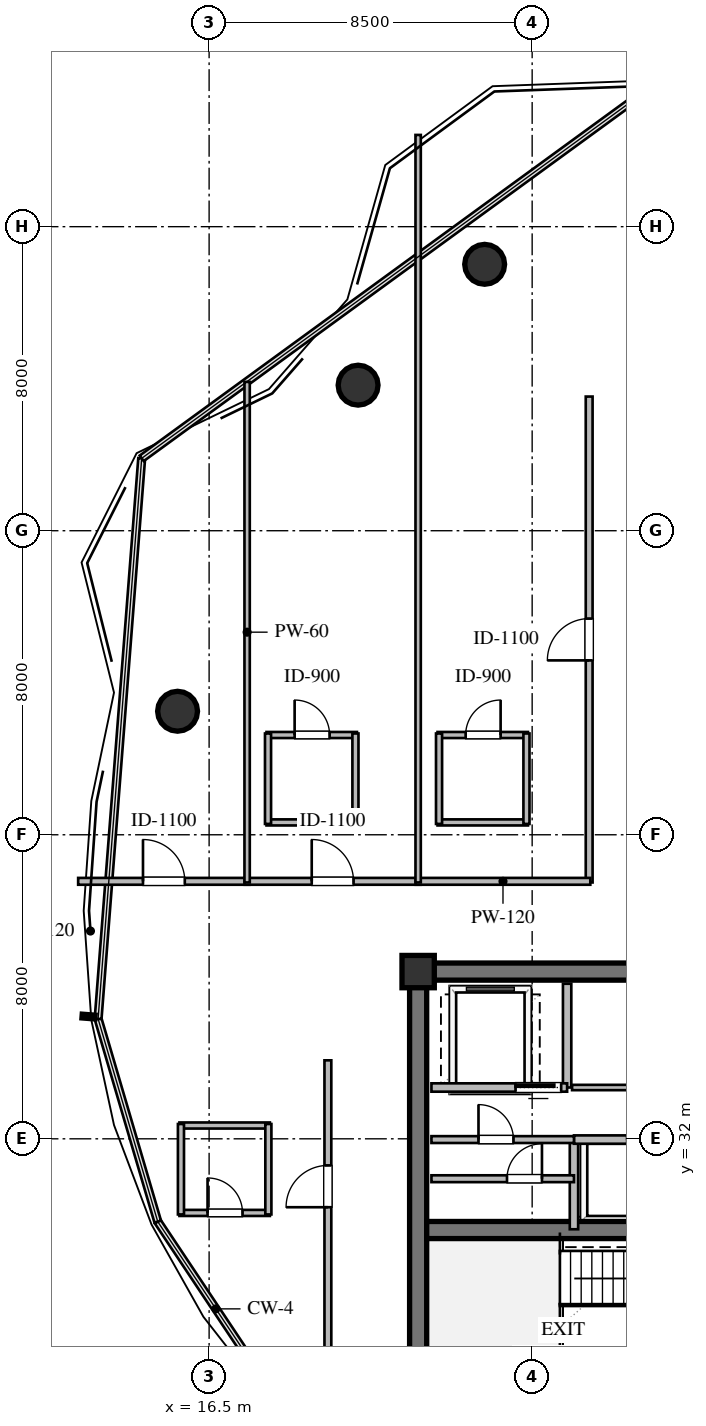
"""IFC4 building model, lengths in metres.
Left out: names, types, materials, properties, quantities, classifications, styles, units other than length and angle.
Written with IfcOpenShell. Run it as: python <this file> out.ifc"""

import sys

from ifc_helpers import new_model, si_unit, direction, frame, frame_2d, origin, origin_2d, place, context, subcontext, project, spatial, rectangle, circle, extrude, element, fill, save


model = new_model("IFC4")
c1 = context("Model", 3, precision=1e-05, world=origin(), true_north=direction((0.0, 1.0)))
c2 = subcontext(c1, "Body", "Model", "MODEL_VIEW")
j1 = project(units=[si_unit("LENGTHUNIT", "METRE"), si_unit("PLANEANGLEUNIT", "RADIAN")], contexts=[c1])
p1 = place(None, origin())
s1 = spatial("IfcSite", under=j1, at=p1, CompositionType="ELEMENT")
p2 = place(p1, origin())
s2 = spatial("IfcBuilding", under=s1, at=p2, CompositionType="ELEMENT")
p3 = place(p2, frame((0.0, 0.0, 220.8)))
s3 = spatial("IfcBuildingStorey", under=s2, at=p3, CompositionType="ELEMENT", Elevation=220.8)
p4 = place(p3, frame((21.775, 36.4, 0.0), z_axis=(0.0, 0.0, 1.0), x_axis=(1.0, 0.0, 0.0)))
e1 = element("IfcWall", 1, at=p4, inside=s3, PredefinedType="SHEAR", context=c2, shape_type="SweptSolid", body=[
    extrude(rectangle(XDim=22.45, YDim=0.45, at=frame_2d((11.225, 0.0))), origin(), (0.0, 0.0, 1.0), 3.36),
])
p5 = place(p3, frame((22.0, 23.825, 0.0), z_axis=(0.0, 0.0, 1.0), x_axis=(0.0, 1.0, 0.0)))
e2 = element("IfcWall", 2, at=p5, inside=s3, PredefinedType="SHEAR", context=c2, shape_type="SweptSolid", body=[
    extrude(rectangle(XDim=12.35, YDim=0.45, at=frame_2d((6.175, 0.0))), origin(), (0.0, 0.0, 1.0), 3.36),
])
p6 = place(p3, frame((22.225, 29.6, 0.0), z_axis=(0.0, 0.0, 1.0), x_axis=(1.0, 0.0, 0.0)))
e3 = element("IfcWall", 3, at=p6, inside=s3, PredefinedType="SHEAR", context=c2, shape_type="SweptSolid", body=[
    extrude(rectangle(XDim=21.55, YDim=0.45, at=frame_2d((10.775, 0.0))), origin(), (0.0, 0.0, 1.0), 3.36),
])
p7 = place(p6, frame((12.225, 0.0, 0.0)))
e4 = element("IfcOpeningElement", 4, at=p7, cuts=e3, PredefinedType="OPENING", context=c2, shape_type="SweptSolid", body=[
    extrude(rectangle(XDim=1.15, YDim=2.1, at=frame_2d((0.575, 1.05))), frame((0.0, 0.235, 0.0), z_axis=(0.0, -1.0, 0.0), x_axis=(1.0, 0.0, 0.0)), (0.0, 0.0, 1.0), 0.47),
])
p8 = place(p3, frame((22.0, 36.4, 0.0), z_axis=(0.0, 0.0, 1.0), x_axis=(1.0, 0.0, 0.0)))
e5 = element("IfcColumn", 5, at=p8, inside=s3, PredefinedType="COLUMN", context=c2, shape_type="SweptSolid", body=[
    extrude(rectangle(XDim=0.85, YDim=0.85, at=origin_2d()), origin(), (0.0, 0.0, 1.0), 3.6),
])
for number, where, z_axis, x_axis in (
    (6, (23.75, 55.01, 0.0), (0.0, 0.0, 1.0), (1.0, 0.0, 0.0)),
    (7, (20.42, 51.83, 0.0), (0.0, 0.0, 1.0), (1.0, 0.0, 0.0)),
    (8, (15.67, 43.25, 0.0), (0.0, 0.0, 1.0), (1.0, 0.0, 0.0)),
):
    element("IfcColumn", number, at=place(p3, frame(where, z_axis=z_axis, x_axis=x_axis)), inside=s3, PredefinedType="COLUMN", context=c2, shape_type="SweptSolid", body=[
        extrude(circle(Radius=0.525, at=origin_2d()), origin(), (0.0, 0.0, 1.0), 3.6),
    ])
p9 = place(p3, frame((25.92, 33.35, 0.0), z_axis=(0.0, 0.0, 1.0), x_axis=(0.0, 1.0, 0.0)))
e9 = element("IfcWall", 9, at=p9, inside=s3, PredefinedType="SOLIDWALL", context=c2, shape_type="SweptSolid", body=[
    extrude(rectangle(XDim=2.73, YDim=0.22, at=frame_2d((1.365, 0.0))), origin(), (0.0, 0.0, 1.0), 3.36),
])
p10 = place(p3, frame((22.35, 33.35, 0.0), z_axis=(0.0, 0.0, 1.0), x_axis=(1.0, 0.0, 0.0)))
e10 = element("IfcWall", 10, at=p10, inside=s3, PredefinedType="SOLIDWALL", context=c2, shape_type="SweptSolid", body=[
    extrude(rectangle(XDim=3.57, YDim=0.22, at=frame_2d((1.785, 0.0))), origin(), (0.0, 0.0, 1.0), 3.36),
])
p11 = place(p10, frame((2.213, 0.0, 0.0)))
e11 = element("IfcOpeningElement", 11, at=p11, cuts=e10, PredefinedType="OPENING", context=c2, shape_type="SweptSolid", body=[
    extrude(rectangle(XDim=1.2, YDim=2.1, at=frame_2d((0.6, 1.05))), frame((0.0, 0.12, 0.0), z_axis=(0.0, -1.0, 0.0), x_axis=(1.0, 0.0, 0.0)), (0.0, 0.0, 1.0), 0.24),
])
p12 = place(p3, frame((26.1, 29.62, 0.0), z_axis=(0.0, 0.0, 1.0), x_axis=(0.0, 1.0, 0.0)))
e12 = element("IfcWall", 12, at=p12, inside=s3, PredefinedType="SOLIDWALL", context=c2, shape_type="SweptSolid", body=[
    extrude(rectangle(XDim=2.36, YDim=0.22, at=frame_2d((1.18, 0.0))), origin(), (0.0, 0.0, 1.0), 3.36),
])
p13 = place(p3, frame((26.1, 31.98, 0.0), z_axis=(0.0, 0.0, 1.0), x_axis=(1.0, 0.0, 0.0)))
e13 = element("IfcWall", 13, at=p13, inside=s3, PredefinedType="SOLIDWALL", context=c2, shape_type="SweptSolid", body=[
    extrude(rectangle(XDim=7.8, YDim=0.22, at=frame_2d((3.9, 0.0))), origin(), (0.0, 0.0, 1.0), 3.36),
])
p14 = place(p13, frame((1.4, 0.0, 0.0)))
e14 = element("IfcOpeningElement", 14, at=p14, cuts=e13, PredefinedType="OPENING", context=c2, shape_type="SweptSolid", body=[
    extrude(rectangle(XDim=1.1, YDim=2.1, at=frame_2d((0.55, 1.05))), frame((0.0, 0.12, 0.0), z_axis=(0.0, -1.0, 0.0), x_axis=(1.0, 0.0, 0.0)), (0.0, 0.0, 1.0), 0.24),
])
p15 = place(p13, frame((5.066, 0.0, 0.0)))
e15 = element("IfcOpeningElement", 15, at=p15, cuts=e13, PredefinedType="OPENING", context=c2, shape_type="SweptSolid", body=[
    extrude(rectangle(XDim=1.1, YDim=2.1, at=frame_2d((0.55, 1.05))), frame((0.0, 0.12, 0.0), z_axis=(0.0, -1.0, 0.0), x_axis=(1.0, 0.0, 0.0)), (0.0, 0.0, 1.0), 0.24),
])
p16 = place(p3, frame((26.05, 33.35, 0.0), z_axis=(0.0, 0.0, 1.0), x_axis=(1.0, 0.0, 0.0)))
e16 = element("IfcWall", 16, at=p16, inside=s3, PredefinedType="PARTITIONING", context=c2, shape_type="SweptSolid", body=[
    extrude(rectangle(XDim=3.95, YDim=0.14, at=frame_2d((1.975, 0.0))), origin(), (0.0, 0.0, 1.0), 3.36),
])
p17 = place(p16, frame((1.515, 0.0, 0.0)))
e17 = element("IfcOpeningElement", 17, at=p17, cuts=e16, PredefinedType="OPENING", context=c2, shape_type="SweptSolid", body=[
    extrude(rectangle(XDim=0.92, YDim=2.1, at=frame_2d((0.46, 1.05))), frame((0.0, 0.08, 0.0), z_axis=(0.0, -1.0, 0.0), x_axis=(1.0, 0.0, 0.0)), (0.0, 0.0, 1.0), 0.16),
])
p18 = place(p3, frame((22.35, 30.95, 0.0), z_axis=(0.0, 0.0, 1.0), x_axis=(1.0, 0.0, 0.0)))
e18 = element("IfcWall", 18, at=p18, inside=s3, PredefinedType="PARTITIONING", context=c2, shape_type="SweptSolid", body=[
    extrude(rectangle(XDim=3.75, YDim=0.18, at=frame_2d((1.875, 0.0))), origin(), (0.0, 0.0, 1.0), 3.36),
])
p19 = place(p18, frame((1.988, 0.0, 0.0)))
e19 = element("IfcOpeningElement", 19, at=p19, cuts=e18, PredefinedType="OPENING", context=c2, shape_type="SweptSolid", body=[
    extrude(rectangle(XDim=0.92, YDim=2.1, at=frame_2d((0.46, 1.05))), frame((0.0, 0.1, 0.0), z_axis=(0.0, -1.0, 0.0), x_axis=(1.0, 0.0, 0.0)), (0.0, 0.0, 1.0), 0.2),
])
p20 = place(p3, frame((22.35, 31.98, 0.0), z_axis=(0.0, 0.0, 1.0), x_axis=(1.0, 0.0, 0.0)))
e20 = element("IfcWall", 20, at=p20, inside=s3, PredefinedType="PARTITIONING", context=c2, shape_type="SweptSolid", body=[
    extrude(rectangle(XDim=3.75, YDim=0.18, at=frame_2d((1.875, 0.0))), origin(), (0.0, 0.0, 1.0), 3.36),
])
p21 = place(p20, frame((1.238, 0.0, 0.0)))
e21 = element("IfcOpeningElement", 21, at=p21, cuts=e20, PredefinedType="OPENING", context=c2, shape_type="SweptSolid", body=[
    extrude(rectangle(XDim=0.92, YDim=2.1, at=frame_2d((0.46, 1.05))), frame((0.0, 0.1, 0.0), z_axis=(0.0, -1.0, 0.0), x_axis=(1.0, 0.0, 0.0)), (0.0, 0.0, 1.0), 0.2),
])
p22 = place(p3, frame((18.01, 40.325, 0.0), z_axis=(0.0, 0.0, 1.0), x_axis=(1.0, 0.0, 0.0)))
e22 = element("IfcWall", 22, at=p22, inside=s3, PredefinedType="PLUMBINGWALL", context=c2, shape_type="SweptSolid", body=[
    extrude(rectangle(XDim=2.38, YDim=0.16, at=frame_2d((1.19, 0.0))), origin(), (0.0, 0.0, 1.0), 3.36),
])
p23 = place(p3, frame((18.01, 42.625, 0.0), z_axis=(0.0, 0.0, 1.0), x_axis=(1.0, 0.0, 0.0)))
e23 = element("IfcWall", 23, at=p23, inside=s3, PredefinedType="PLUMBINGWALL", context=c2, shape_type="SweptSolid", body=[
    extrude(rectangle(XDim=2.38, YDim=0.16, at=frame_2d((1.19, 0.0))), origin(), (0.0, 0.0, 1.0), 3.36),
])
p24 = place(p23, frame((0.74, 0.0, 0.0)))
e24 = element("IfcOpeningElement", 24, at=p24, cuts=e23, PredefinedType="OPENING", context=c2, shape_type="SweptSolid", body=[
    extrude(rectangle(XDim=0.92, YDim=2.1, at=frame_2d((0.46, 1.05))), frame((0.0, 0.09, 0.0), z_axis=(0.0, -1.0, 0.0), x_axis=(1.0, 0.0, 0.0)), (0.0, 0.0, 1.0), 0.18),
])
for number, where, z_axis, x_axis in (
    (25, (18.05, 40.285, 0.0), (0.0, 0.0, 1.0), (0.0, 1.0, 0.0)),
    (26, (20.35, 40.285, 0.0), (0.0, 0.0, 1.0), (0.0, 1.0, 0.0)),
):
    element("IfcWall", number, at=place(p3, frame(where, z_axis=z_axis, x_axis=x_axis)), inside=s3, PredefinedType="PLUMBINGWALL", context=c2, shape_type="SweptSolid", body=[
        extrude(rectangle(XDim=2.38, YDim=0.16, at=frame_2d((1.19, 0.0))), origin(), (0.0, 0.0, 1.0), 3.36),
    ])
p25 = place(p3, frame((22.51, 40.325, 0.0), z_axis=(0.0, 0.0, 1.0), x_axis=(1.0, 0.0, 0.0)))
e27 = element("IfcWall", 27, at=p25, inside=s3, PredefinedType="PLUMBINGWALL", context=c2, shape_type="SweptSolid", body=[
    extrude(rectangle(XDim=2.38, YDim=0.16, at=frame_2d((1.19, 0.0))), origin(), (0.0, 0.0, 1.0), 3.36),
])
p26 = place(p3, frame((22.51, 42.625, 0.0), z_axis=(0.0, 0.0, 1.0), x_axis=(1.0, 0.0, 0.0)))
e28 = element("IfcWall", 28, at=p26, inside=s3, PredefinedType="PLUMBINGWALL", context=c2, shape_type="SweptSolid", body=[
    extrude(rectangle(XDim=2.38, YDim=0.16, at=frame_2d((1.19, 0.0))), origin(), (0.0, 0.0, 1.0), 3.36),
])
p27 = place(p26, frame((0.74, 0.0, 0.0)))
e29 = element("IfcOpeningElement", 29, at=p27, cuts=e28, PredefinedType="OPENING", context=c2, shape_type="SweptSolid", body=[
    extrude(rectangle(XDim=0.92, YDim=2.1, at=frame_2d((0.46, 1.05))), frame((0.0, 0.09, 0.0), z_axis=(0.0, -1.0, 0.0), x_axis=(1.0, 0.0, 0.0)), (0.0, 0.0, 1.0), 0.18),
])
p28 = place(p3, frame((22.55, 40.285, 0.0), z_axis=(0.0, 0.0, 1.0), x_axis=(0.0, 1.0, 0.0)))
e30 = element("IfcWall", 30, at=p28, inside=s3, PredefinedType="PLUMBINGWALL", context=c2, shape_type="SweptSolid", body=[
    extrude(rectangle(XDim=2.38, YDim=0.16, at=frame_2d((1.19, 0.0))), origin(), (0.0, 0.0, 1.0), 2.806),
])
p29 = place(p3, frame((24.85, 40.285, 0.0), z_axis=(0.0, 0.0, 1.0), x_axis=(0.0, 1.0, 0.0)))
e31 = element("IfcWall", 31, at=p29, inside=s3, PredefinedType="PLUMBINGWALL", context=c2, shape_type="SweptSolid", body=[
    extrude(rectangle(XDim=2.38, YDim=0.16, at=frame_2d((1.19, 0.0))), origin(), (0.0, 0.0, 1.0), 3.36),
])
p30 = place(p3, frame((15.719, 30.05, 0.0), z_axis=(0.0, 0.0, 1.0), x_axis=(1.0, 0.0, 0.0)))
e32 = element("IfcWall", 32, at=p30, inside=s3, PredefinedType="PLUMBINGWALL", context=c2, shape_type="SweptSolid", body=[
    extrude(rectangle(XDim=2.38, YDim=0.16, at=frame_2d((1.19, 0.0))), origin(), (0.0, 0.0, 1.0), 3.36),
])
p31 = place(p30, frame((0.74, 0.0, 0.0)))
e33 = element("IfcOpeningElement", 33, at=p31, cuts=e32, PredefinedType="OPENING", context=c2, shape_type="SweptSolid", body=[
    extrude(rectangle(XDim=0.92, YDim=2.1, at=frame_2d((0.46, 1.05))), frame((0.0, 0.09, 0.0), z_axis=(0.0, -1.0, 0.0), x_axis=(1.0, 0.0, 0.0)), (0.0, 0.0, 1.0), 0.18),
])
p32 = place(p3, frame((15.719, 32.35, 0.0), z_axis=(0.0, 0.0, 1.0), x_axis=(1.0, 0.0, 0.0)))
e34 = element("IfcWall", 34, at=p32, inside=s3, PredefinedType="PLUMBINGWALL", context=c2, shape_type="SweptSolid", body=[
    extrude(rectangle(XDim=2.38, YDim=0.16, at=frame_2d((1.19, 0.0))), origin(), (0.0, 0.0, 1.0), 3.36),
])
p33 = place(p3, frame((15.759, 30.01, 0.0), z_axis=(0.0, 0.0, 1.0), x_axis=(0.0, 1.0, 0.0)))
e35 = element("IfcWall", 35, at=p33, inside=s3, PredefinedType="PLUMBINGWALL", context=c2, shape_type="SweptSolid", body=[
    extrude(rectangle(XDim=2.38, YDim=0.16, at=frame_2d((1.19, 0.0))), origin(), (0.0, 0.0, 1.0), 3.36),
])
p34 = place(p3, frame((18.059, 30.01, 0.0), z_axis=(0.0, 0.0, 1.0), x_axis=(0.0, 1.0, 0.0)))
e36 = element("IfcWall", 36, at=p34, inside=s3, PredefinedType="PLUMBINGWALL", context=c2, shape_type="SweptSolid", body=[
    extrude(rectangle(XDim=2.38, YDim=0.16, at=frame_2d((1.19, 0.0))), origin(), (0.0, 0.0, 1.0), 2.817),
])
p35 = place(p3, frame((13.054, 38.775, 0.0), z_axis=(0.0, 0.0, 1.0), x_axis=(1.0, 0.0, 0.0)))
e37 = element("IfcWall", 37, at=p35, inside=s3, PredefinedType="PARTITIONING", context=c2, shape_type="SweptSolid", body=[
    extrude(rectangle(XDim=4.511, YDim=0.18, at=frame_2d((2.255, 0.0))), origin(), (0.0, 0.0, 1.0), 3.36),
])
p36 = place(p35, frame((1.706, 0.0, 0.0)))
e38 = element("IfcOpeningElement", 38, at=p36, cuts=e37, PredefinedType="OPENING", context=c2, shape_type="SweptSolid", body=[
    extrude(rectangle(XDim=1.1, YDim=2.1, at=frame_2d((0.55, 1.05))), frame((0.0, 0.1, 0.0), z_axis=(0.0, -1.0, 0.0), x_axis=(1.0, 0.0, 0.0)), (0.0, 0.0, 1.0), 0.2),
])
p37 = place(p3, frame((17.435, 38.775, 0.0), z_axis=(0.0, 0.0, 1.0), x_axis=(1.0, 0.0, 0.0)))
e39 = element("IfcWall", 39, at=p37, inside=s3, PredefinedType="PARTITIONING", context=c2, shape_type="SweptSolid", body=[
    extrude(rectangle(XDim=4.63, YDim=0.18, at=frame_2d((2.315, 0.0))), origin(), (0.0, 0.0, 1.0), 3.36),
])
p38 = place(p37, frame((1.765, 0.0, 0.0)))
e40 = element("IfcOpeningElement", 40, at=p38, cuts=e39, PredefinedType="OPENING", context=c2, shape_type="SweptSolid", body=[
    extrude(rectangle(XDim=1.1, YDim=2.1, at=frame_2d((0.55, 1.05))), frame((0.0, 0.1, 0.0), z_axis=(0.0, -1.0, 0.0), x_axis=(1.0, 0.0, 0.0)), (0.0, 0.0, 1.0), 0.2),
])
p39 = place(p3, frame((26.5, 38.745, 0.0), z_axis=(0.0, 0.0, 1.0), x_axis=(0.0, 1.0, 0.0)))
e41 = element("IfcWall", 41, at=p39, inside=s3, PredefinedType="PARTITIONING", context=c2, shape_type="SweptSolid", body=[
    extrude(rectangle(XDim=12.785, YDim=0.18, at=frame_2d((6.393, 0.0))), origin(), (0.0, 0.0, 1.0), 3.36),
])
p40 = place(p39, frame((5.843, 0.0, 0.0)))
e42 = element("IfcOpeningElement", 42, at=p40, cuts=e41, PredefinedType="OPENING", context=c2, shape_type="SweptSolid", body=[
    extrude(rectangle(XDim=1.1, YDim=2.1, at=frame_2d((0.55, 1.05))), frame((0.0, 0.1, 0.0), z_axis=(0.0, -1.0, 0.0), x_axis=(1.0, 0.0, 0.0)), (0.0, 0.0, 1.0), 0.2),
])
p41 = place(p3, frame((21.935, 38.775, 0.0), z_axis=(0.0, 0.0, 1.0), x_axis=(1.0, 0.0, 0.0)))
e43 = element("IfcWall", 43, at=p41, inside=s3, PredefinedType="PARTITIONING", context=c2, shape_type="SweptSolid", body=[
    extrude(rectangle(XDim=4.595, YDim=0.18, at=frame_2d((2.297, 0.0))), origin(), (0.0, 0.0, 1.0), 3.36),
])
p42 = place(p3, frame((19.625, 24.06, 0.0), z_axis=(0.0, 0.0, 1.0), x_axis=(0.0, 1.0, 0.0)))
e44 = element("IfcWall", 44, at=p42, inside=s3, PredefinedType="PARTITIONING", context=c2, shape_type="SweptSolid", body=[
    extrude(rectangle(XDim=10.005, YDim=0.18, at=frame_2d((5.002, 0.0))), origin(), (0.0, 0.0, 1.0), 2.817),
])
p43 = place(p42, frame((6.14, 0.0, 0.0)))
e45 = element("IfcOpeningElement", 45, at=p43, cuts=e44, PredefinedType="OPENING", context=c2, shape_type="SweptSolid", body=[
    extrude(rectangle(XDim=1.1, YDim=2.1, at=frame_2d((0.55, 1.05))), frame((0.0, 0.1, 0.0), z_axis=(0.0, -1.0, 0.0), x_axis=(1.0, 0.0, 0.0)), (0.0, 0.0, 1.0), 0.2),
])
p44 = place(p3, frame((17.5, 51.916, 0.0), z_axis=(0.0, 0.0, 1.0), x_axis=(0.0, -1.0, 0.0)))
e46 = element("IfcWall", 46, at=p44, inside=s3, PredefinedType="PARTITIONING", context=c2, shape_type="SweptSolid", body=[
    extrude(rectangle(XDim=13.171, YDim=0.14, at=frame_2d((6.585, 0.0))), origin(), (0.0, 0.0, 1.0), 3.36),
])
p45 = place(p3, frame((22.0, 58.414, 0.0), z_axis=(0.0, 0.0, 1.0), x_axis=(0.0, -1.0, 0.0)))
e47 = element("IfcWall", 47, at=p45, inside=s3, PredefinedType="PARTITIONING", context=c2, shape_type="SweptSolid", body=[
    extrude(rectangle(XDim=19.669, YDim=0.14, at=frame_2d((9.834, 0.0))), origin(), (0.0, 0.0, 1.0), 2.806),
])
p46 = place(p11, origin())
e48 = element("IfcDoor", 48, at=p46, inside=s3, OperationType="SLIDING_TO_LEFT", PredefinedType="DOOR", context=c2, shape_type="SweptSolid", body=[
    extrude(rectangle(XDim=1.2, YDim=2.1, at=frame_2d((0.6, 1.05))), frame((0.0, 0.025, 0.0), z_axis=(0.0, -1.0, 0.0), x_axis=(1.0, 0.0, 0.0)), (0.0, 0.0, 1.0), 0.05),
])
fill(e11, e48)
p47 = place(p21, origin())
e49 = element("IfcDoor", 49, at=p47, inside=s3, OperationType="SINGLE_SWING_LEFT", PredefinedType="DOOR", context=c2, shape_type="SweptSolid", body=[
    extrude(rectangle(XDim=0.92, YDim=2.1, at=frame_2d((0.46, 1.05))), frame((0.0, 0.025, 0.0), z_axis=(0.0, -1.0, 0.0), x_axis=(1.0, 0.0, 0.0)), (0.0, 0.0, 1.0), 0.05),
])
fill(e21, e49)
p48 = place(p19, origin())
e50 = element("IfcDoor", 50, at=p48, inside=s3, OperationType="SINGLE_SWING_RIGHT", PredefinedType="DOOR", context=c2, shape_type="SweptSolid", body=[
    extrude(rectangle(XDim=0.92, YDim=2.1, at=frame_2d((0.46, 1.05))), frame((0.0, 0.025, 0.0), z_axis=(0.0, -1.0, 0.0), x_axis=(1.0, 0.0, 0.0)), (0.0, 0.0, 1.0), 0.05),
])
fill(e19, e50)
p49 = place(p24, origin())
e51 = element("IfcDoor", 51, at=p49, inside=s3, OperationType="SINGLE_SWING_LEFT", PredefinedType="DOOR", context=c2, shape_type="SweptSolid", body=[
    extrude(rectangle(XDim=0.92, YDim=2.1, at=frame_2d((0.46, 1.05))), frame((0.0, 0.025, 0.0), z_axis=(0.0, -1.0, 0.0), x_axis=(1.0, 0.0, 0.0)), (0.0, 0.0, 1.0), 0.05),
])
fill(e24, e51)
p50 = place(p27, origin())
e52 = element("IfcDoor", 52, at=p50, inside=s3, OperationType="SINGLE_SWING_RIGHT", PredefinedType="DOOR", context=c2, shape_type="SweptSolid", body=[
    extrude(rectangle(XDim=0.92, YDim=2.1, at=frame_2d((0.46, 1.05))), frame((0.0, 0.025, 0.0), z_axis=(0.0, -1.0, 0.0), x_axis=(1.0, 0.0, 0.0)), (0.0, 0.0, 1.0), 0.05),
])
fill(e29, e52)
p51 = place(p31, origin())
e53 = element("IfcDoor", 53, at=p51, inside=s3, OperationType="SINGLE_SWING_LEFT", PredefinedType="DOOR", context=c2, shape_type="SweptSolid", body=[
    extrude(rectangle(XDim=0.92, YDim=2.1, at=frame_2d((0.46, 1.05))), frame((0.0, 0.025, 0.0), z_axis=(0.0, -1.0, 0.0), x_axis=(1.0, 0.0, 0.0)), (0.0, 0.0, 1.0), 0.05),
])
fill(e33, e53)
p52 = place(p36, origin())
e54 = element("IfcDoor", 54, at=p52, inside=s3, OperationType="SINGLE_SWING_LEFT", PredefinedType="DOOR", context=c2, shape_type="SweptSolid", body=[
    extrude(rectangle(XDim=1.1, YDim=2.1, at=frame_2d((0.55, 1.05))), frame((0.0, 0.025, 0.0), z_axis=(0.0, -1.0, 0.0), x_axis=(1.0, 0.0, 0.0)), (0.0, 0.0, 1.0), 0.05),
])
fill(e38, e54)
p53 = place(p38, origin())
e55 = element("IfcDoor", 55, at=p53, inside=s3, OperationType="SINGLE_SWING_LEFT", PredefinedType="DOOR", context=c2, shape_type="SweptSolid", body=[
    extrude(rectangle(XDim=1.1, YDim=2.1, at=frame_2d((0.55, 1.05))), frame((0.0, 0.025, 0.0), z_axis=(0.0, -1.0, 0.0), x_axis=(1.0, 0.0, 0.0)), (0.0, 0.0, 1.0), 0.05),
])
fill(e40, e55)
p54 = place(p40, origin())
e56 = element("IfcDoor", 56, at=p54, inside=s3, OperationType="SINGLE_SWING_LEFT", PredefinedType="DOOR", context=c2, shape_type="SweptSolid", body=[
    extrude(rectangle(XDim=1.1, YDim=2.1, at=frame_2d((0.55, 1.05))), frame((0.0, 0.025, 0.0), z_axis=(0.0, -1.0, 0.0), x_axis=(1.0, 0.0, 0.0)), (0.0, 0.0, 1.0), 0.05),
])
fill(e42, e56)
p55 = place(p43, origin())
e57 = element("IfcDoor", 57, at=p55, inside=s3, OperationType="SINGLE_SWING_LEFT", PredefinedType="DOOR", context=c2, shape_type="SweptSolid", body=[
    extrude(rectangle(XDim=1.1, YDim=2.1, at=frame_2d((0.55, 1.05))), frame((0.0, 0.025, 0.0), z_axis=(0.0, -1.0, 0.0), x_axis=(1.0, 0.0, 0.0)), (0.0, 0.0, 1.0), 0.05),
])
fill(e45, e57)
save(model, sys.argv[1])
